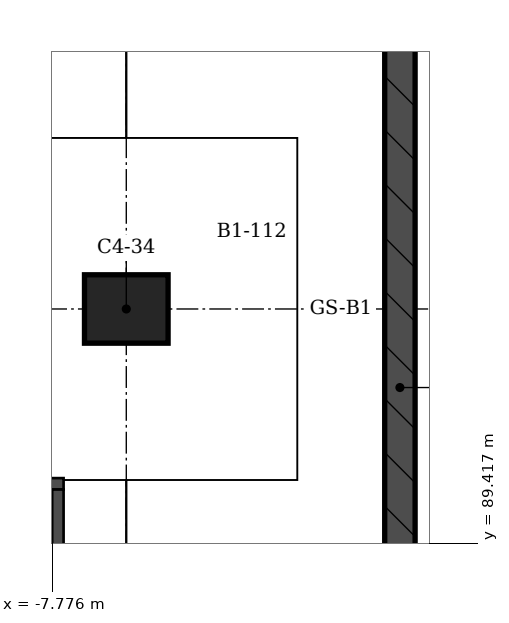
"""IFC4 building model, lengths in metres.
Left out: names, types, materials, properties, quantities, classifications, styles, units other than length and angle.
Written with IfcOpenShell. Run it as: python <this file> out.ifc"""

import sys

from ifc_helpers import new_model, si_unit, direction, frame, frame_2d, origin, origin_2d, place, context, subcontext, project, spatial, rectangle, extrude, element, save


model = new_model("IFC4")
c1 = context("Model", 3, precision=1e-05, world=origin(), true_north=direction((0.0, 1.0)))
c2 = subcontext(c1, "Body", "Model", "MODEL_VIEW")
j1 = project(units=[si_unit("LENGTHUNIT", "METRE"), si_unit("PLANEANGLEUNIT", "RADIAN")], contexts=[c1])
p1 = place(None, origin())
s1 = spatial("IfcSite", under=j1, at=p1, CompositionType="ELEMENT")
p2 = place(p1, origin())
s2 = spatial("IfcBuilding", under=s1, at=p2, CompositionType="ELEMENT")
p3 = place(p2, frame((0.0, 0.0, -4.5)))
s3 = spatial("IfcBuildingStorey", under=s2, at=p3, CompositionType="ELEMENT", Elevation=-4.5)
p4 = place(p3, frame((-6.8, 92.5, 0.0), z_axis=(0.0, 0.0, 1.0), x_axis=(-1.0, 0.0, 0.0)))
e1 = element("IfcColumn", 1, at=p4, inside=s3, PredefinedType="COLUMN", context=c2, shape_type="SweptSolid", body=[
    extrude(rectangle(XDim=1.1, YDim=0.9, at=origin_2d()), origin(), (0.0, 0.0, 1.0), 4.5),
])
p5 = place(p3, frame((-3.2, 60.0, 0.0), z_axis=(0.0, 0.0, 1.0), x_axis=(0.0, 1.0, 0.0)))
e2 = element("IfcWall", 2, at=p5, inside=s3, PredefinedType="STANDARD", context=c2, shape_type="SweptSolid", body=[
    extrude(rectangle(XDim=42.5, YDim=0.4, at=frame_2d((21.25, 0.0))), origin(), (0.0, 0.0, 1.0), 3.5),
])
p6 = place(p3, frame((-7.625, 90.2, 0.0), z_axis=(0.0, 0.0, 1.0), x_axis=(-1.0, 0.0, 0.0)))
e3 = element("IfcWall", 3, at=p6, inside=s3, PredefinedType="SOLIDWALL", context=c2, shape_type="SweptSolid", body=[
    extrude(rectangle(XDim=11.95, YDim=0.15, at=frame_2d((5.975, 0.0))), origin(), (0.0, 0.0, 1.0), 3.0),
])
p7 = place(p6, frame((2.525, 0.0, 0.0)))
e4 = element("IfcOpeningElement", 4, at=p7, cuts=e3, PredefinedType="OPENING", context=c2, shape_type="SweptSolid", body=[
    extrude(rectangle(XDim=1.0, YDim=2.1, at=frame_2d((0.5, 1.05))), frame((0.0, 0.075, 0.0), z_axis=(0.0, -1.0, 0.0), x_axis=(1.0, 0.0, 0.0)), (0.0, 0.0, 1.0), 0.15),
])
p8 = place(p6, frame((8.425, 0.0, 0.0)))
e5 = element("IfcOpeningElement", 5, at=p8, cuts=e3, PredefinedType="OPENING", context=c2, shape_type="SweptSolid", body=[
    extrude(rectangle(XDim=1.0, YDim=2.1, at=frame_2d((0.5, 1.05))), frame((0.0, 0.075, 0.0), z_axis=(0.0, -1.0, 0.0), x_axis=(1.0, 0.0, 0.0)), (0.0, 0.0, 1.0), 0.15),
])
p9 = place(p3, frame((-7.7, 80.575, 0.0), z_axis=(0.0, 0.0, 1.0), x_axis=(0.0, 1.0, 0.0)))
e6 = element("IfcWall", 6, at=p9, inside=s3, PredefinedType="SOLIDWALL", context=c2, shape_type="SweptSolid", body=[
    extrude(rectangle(XDim=9.55, YDim=0.15, at=frame_2d((4.775, 0.0))), origin(), (0.0, 0.0, 1.0), 3.0),
])
save(model, sys.argv[1])
